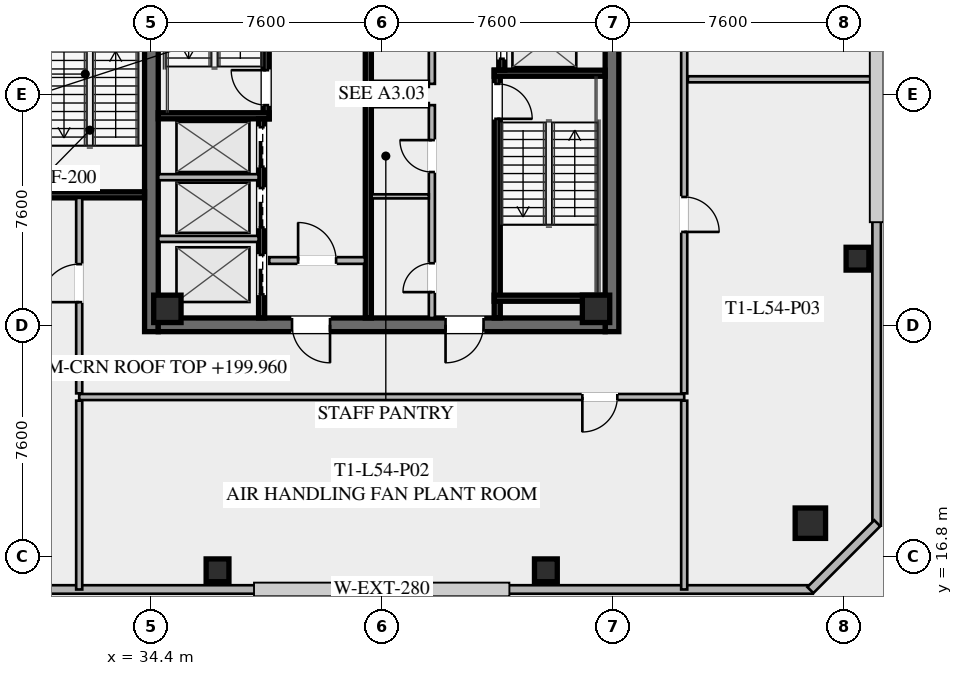
"""IFC4 building model, lengths in metres.
Left out: names, types, materials, properties, quantities, classifications, styles, units other than length and angle.
Written with IfcOpenShell. Run it as: python <this file> out.ifc"""

import sys

from ifc_helpers import new_model, si_unit, direction, frame, frame_2d, origin, origin_2d, place, context, subcontext, project, spatial, rectangle, hollow_rectangle, extrude, element, fill, save


model = new_model("IFC4")
c1 = context("Model", 3, precision=1e-05, world=origin(), true_north=direction((0.0, 1.0)))
c2 = subcontext(c1, "Body", "Model", "MODEL_VIEW")
j1 = project(units=[si_unit("LENGTHUNIT", "METRE"), si_unit("PLANEANGLEUNIT", "RADIAN")], contexts=[c1])
p1 = place(None, origin())
s1 = spatial("IfcSite", under=j1, at=p1, CompositionType="ELEMENT")
p2 = place(p1, origin())
s2 = spatial("IfcBuilding", under=s1, at=p2, CompositionType="ELEMENT")
p3 = place(p2, frame((0.0, 0.0, 199.6)))
s3 = spatial("IfcBuildingStorey", under=s2, at=p3, CompositionType="ELEMENT", Elevation=199.6)
for number, where, z_axis, x_axis in (
    (1, (34.425, 24.2, 0.0), (0.0, 0.0, 1.0), (0.0, 1.0, 0.0)),
    (2, (49.575, 39.8, 0.0), (0.0, 0.0, 1.0), (0.0, -1.0, 0.0)),
):
    element("IfcWall", number, at=place(p3, frame(where, z_axis=z_axis, x_axis=x_axis)), inside=s3, PredefinedType="SHEAR", context=c2, shape_type="SweptSolid", body=[
        extrude(rectangle(XDim=15.6, YDim=0.45, at=frame_2d((7.8, 0.0))), origin(), (0.0, 0.0, 1.0), 4.6),
    ])
p4 = place(p3, frame((49.35, 24.425, 0.0), z_axis=(0.0, 0.0, 1.0), x_axis=(-1.0, 0.0, 0.0)))
e3 = element("IfcWall", 3, at=p4, inside=s3, PredefinedType="SHEAR", context=c2, shape_type="SweptSolid", body=[
    extrude(rectangle(XDim=14.7, YDim=0.45, at=frame_2d((7.35, 0.0))), origin(), (0.0, 0.0, 1.0), 4.6),
])
p5 = place(p4, frame((9.05, 0.0, 0.0)))
e4 = element("IfcOpeningElement", 4, at=p5, cuts=e3, PredefinedType="OPENING", context=c2, shape_type="SweptSolid", body=[
    extrude(rectangle(XDim=1.25, YDim=2.25, at=frame_2d((0.625, 1.125))), frame((0.0, 0.235, 0.0), z_axis=(0.0, -1.0, 0.0), x_axis=(1.0, 0.0, 0.0)), (0.0, 0.0, 1.0), 0.47),
])
p6 = place(p4, frame((4.0, 0.0, 0.0)))
e5 = element("IfcOpeningElement", 5, at=p6, cuts=e3, PredefinedType="OPENING", context=c2, shape_type="SweptSolid", body=[
    extrude(rectangle(XDim=1.25, YDim=2.25, at=frame_2d((0.625, 1.125))), frame((0.0, 0.235, 0.0), z_axis=(0.0, -1.0, 0.0), x_axis=(1.0, 0.0, 0.0)), (0.0, 0.0, 1.0), 0.47),
])
for number, where, z_axis, x_axis in (
    (6, (34.95, 24.95, 0.0), (0.0, 0.0, 1.0), (1.0, 0.0, 0.0)),
    (7, (49.05, 24.95, 0.0), (0.0, 0.0, 1.0), (1.0, 0.0, 0.0)),
):
    element("IfcColumn", number, at=place(p3, frame(where, z_axis=z_axis, x_axis=x_axis)), inside=s3, PredefinedType="COLUMN", context=c2, shape_type="SweptSolid", body=[
        extrude(hollow_rectangle(XDim=0.9, YDim=0.9, WallThickness=0.04, at=origin_2d()), origin(), (0.0, 0.0, 1.0), 4.42),
    ])
p7 = place(p3, frame((56.1, 17.9, -0.295), z_axis=(0.0, 0.0, 1.0), x_axis=(1.0, 0.0, 0.0)))
e8 = element("IfcColumn", 8, at=p7, inside=s3, PredefinedType="COLUMN", context=c2, shape_type="SweptSolid", body=[
    extrude(hollow_rectangle(XDim=1.0, YDim=1.0, WallThickness=0.04, at=origin_2d()), origin(), (0.0, 0.0, 1.0), 4.715),
])
for number, where, z_axis, x_axis in (
    (9, (36.6, 16.35, -0.295), (0.0, 0.0, 1.0), (1.0, 0.0, 0.0)),
    (10, (47.4, 16.35, -0.295), (0.0, 0.0, 1.0), (1.0, 0.0, 0.0)),
    (11, (57.65, 26.6, -0.295), (0.0, 0.0, 1.0), (1.0, 0.0, 0.0)),
):
    element("IfcColumn", number, at=place(p3, frame(where, z_axis=z_axis, x_axis=x_axis)), inside=s3, PredefinedType="COLUMN", context=c2, shape_type="SweptSolid", body=[
        extrude(hollow_rectangle(XDim=0.75, YDim=0.75, WallThickness=0.032, at=origin_2d()), origin(), (0.0, 0.0, 1.0), 4.715),
    ])
for number, where, z_axis, x_axis in (
    (12, (56.18, 15.72, 0.0), (0.0, 0.0, 1.0), (-1.0, 0.0, 0.0)),
    (13, (58.28, 46.18, 0.0), (0.0, 0.0, 1.0), (0.0, -1.0, 0.0)),
):
    element("IfcWall", number, at=place(p3, frame(where, z_axis=z_axis, x_axis=x_axis)), inside=s3, PredefinedType="SOLIDWALL", context=c2, shape_type="SweptSolid", body=[
        extrude(rectangle(XDim=28.36, YDim=0.28, at=frame_2d((14.18, 0.0))), origin(), (0.0, 0.0, 1.0), 4.42),
    ])
p8 = place(p3, frame((58.3, 17.9, 0.0), z_axis=(0.0, 0.0, 1.0), x_axis=(-0.707106781187, -0.707106781187, 0.0)))
e14 = element("IfcWall", 14, at=p8, inside=s3, PredefinedType="SOLIDWALL", context=c2, shape_type="SweptSolid", body=[
    extrude(rectangle(XDim=3.111, YDim=0.28, at=frame_2d((1.556, 0.0))), origin(), (0.0, 0.0, 1.0), 4.42),
])
p9 = place(p3, frame((38.2, 31.2, 0.0), z_axis=(0.0, 0.0, 1.0), x_axis=(0.0, 1.0, 0.0)))
e15 = element("IfcWall", 15, at=p9, inside=s3, PredefinedType="SHEAR", context=c2, shape_type="SweptSolid", body=[
    extrude(rectangle(XDim=8.15, YDim=0.2, at=frame_2d((4.075, 0.0))), origin(), (0.0, 0.0, 1.0), 4.42),
])
p10 = place(p9, frame((0.45, 0.0, 0.0)))
e16 = element("IfcOpeningElement", 16, at=p10, cuts=e15, PredefinedType="OPENING", context=c2, shape_type="SweptSolid", body=[
    extrude(rectangle(XDim=1.15, YDim=2.2, at=frame_2d((0.575, 1.1))), frame((0.0, 0.11, 0.0), z_axis=(0.0, -1.0, 0.0), x_axis=(1.0, 0.0, 0.0)), (0.0, 0.0, 1.0), 0.22),
])
p11 = place(p3, frame((34.65, 31.3, 0.0), z_axis=(0.0, 0.0, 1.0), x_axis=(1.0, 0.0, 0.0)))
e17 = element("IfcWall", 17, at=p11, inside=s3, PredefinedType="SHEAR", context=c2, shape_type="SweptSolid", body=[
    extrude(rectangle(XDim=3.65, YDim=0.2, at=frame_2d((1.825, 0.0))), origin(), (0.0, 0.0, 1.0), 4.42),
])
p12 = place(p3, frame((45.8, 32.8, 0.0), z_axis=(0.0, 0.0, 1.0), x_axis=(0.0, -1.0, 0.0)))
e18 = element("IfcWall", 18, at=p12, inside=s3, PredefinedType="SHEAR", context=c2, shape_type="SweptSolid", body=[
    extrude(rectangle(XDim=8.15, YDim=0.2, at=frame_2d((4.075, 0.0))), origin(), (0.0, 0.0, 1.0), 4.42),
])
p13 = place(p12, frame((0.45, 0.0, 0.0)))
e19 = element("IfcOpeningElement", 19, at=p13, cuts=e18, PredefinedType="OPENING", context=c2, shape_type="SweptSolid", body=[
    extrude(rectangle(XDim=1.15, YDim=2.2, at=frame_2d((0.575, 1.1))), frame((0.0, 0.11, 0.0), z_axis=(0.0, -1.0, 0.0), x_axis=(1.0, 0.0, 0.0)), (0.0, 0.0, 1.0), 0.22),
])
for number, where, z_axis, x_axis in (
    (20, (45.7, 32.7, 0.0), (0.0, 0.0, 1.0), (1.0, 0.0, 0.0)),
    (21, (45.7, 25.3, 0.0), (0.0, 0.0, 1.0), (1.0, 0.0, 0.0)),
):
    element("IfcWall", number, at=place(p3, frame(where, z_axis=z_axis, x_axis=x_axis)), inside=s3, PredefinedType="SHEAR", context=c2, shape_type="SweptSolid", body=[
        extrude(rectangle(XDim=3.65, YDim=0.2, at=frame_2d((1.825, 0.0))), origin(), (0.0, 0.0, 1.0), 4.42),
    ])
p14 = place(p3, frame((41.56, 24.65, 0.0), z_axis=(0.0, 0.0, 1.0), x_axis=(0.0, 1.0, 0.0)))
e22 = element("IfcWall", 22, at=p14, inside=s3, PredefinedType="SHEAR", context=c2, shape_type="SweptSolid", body=[
    extrude(rectangle(XDim=14.7, YDim=0.2, at=frame_2d((7.35, 0.0))), origin(), (0.0, 0.0, 1.0), 4.42),
])
p15 = place(p3, frame((38.3, 26.54, 0.0), z_axis=(0.0, 0.0, 1.0), x_axis=(1.0, 0.0, 0.0)))
e23 = element("IfcWall", 23, at=p15, inside=s3, PredefinedType="SOLIDWALL", context=c2, shape_type="SweptSolid", body=[
    extrude(rectangle(XDim=3.15, YDim=0.22, at=frame_2d((1.575, 0.0))), origin(), (0.0, 0.0, 1.0), 3.531),
])
p16 = place(p15, frame((0.95, 0.0, 0.0)))
e24 = element("IfcOpeningElement", 24, at=p16, cuts=e23, PredefinedType="OPENING", context=c2, shape_type="SweptSolid", body=[
    extrude(rectangle(XDim=1.25, YDim=2.25, at=frame_2d((0.625, 1.125))), frame((0.0, 0.12, 0.0), z_axis=(0.0, -1.0, 0.0), x_axis=(1.0, 0.0, 0.0)), (0.0, 0.0, 1.0), 0.24),
])
p17 = place(p3, frame((38.05, 24.65, 0.0), z_axis=(0.0, 0.0, 1.0), x_axis=(0.0, 1.0, 0.0)))
e25 = element("IfcWall", 25, at=p17, inside=s3, PredefinedType="SHEAR", context=c2, shape_type="SweptSolid", body=[
    extrude(rectangle(XDim=6.55, YDim=0.2, at=frame_2d((3.275, 0.0))), origin(), (0.0, 0.0, 1.0), 4.42),
])
p18 = place(p17, frame((4.975, 0.0, 0.0)))
e26 = element("IfcOpeningElement", 26, at=p18, cuts=e25, PredefinedType="OPENING", context=c2, shape_type="SweptSolid", body=[
    extrude(rectangle(XDim=1.3, YDim=2.25, at=frame_2d((0.65, 1.125))), frame((0.0, 0.11, 0.0), z_axis=(0.0, -1.0, 0.0), x_axis=(1.0, 0.0, 0.0)), (0.0, 0.0, 1.0), 0.22),
])
p19 = place(p17, frame((2.975, 0.0, 0.0)))
e27 = element("IfcOpeningElement", 27, at=p19, cuts=e25, PredefinedType="OPENING", context=c2, shape_type="SweptSolid", body=[
    extrude(rectangle(XDim=1.3, YDim=2.25, at=frame_2d((0.65, 1.125))), frame((0.0, 0.11, 0.0), z_axis=(0.0, -1.0, 0.0), x_axis=(1.0, 0.0, 0.0)), (0.0, 0.0, 1.0), 0.22),
])
p20 = place(p17, frame((0.775, 0.0, 0.0)))
e28 = element("IfcOpeningElement", 28, at=p20, cuts=e25, PredefinedType="OPENING", context=c2, shape_type="SweptSolid", body=[
    extrude(rectangle(XDim=1.3, YDim=2.25, at=frame_2d((0.65, 1.125))), frame((0.0, 0.11, 0.0), z_axis=(0.0, -1.0, 0.0), x_axis=(1.0, 0.0, 0.0)), (0.0, 0.0, 1.0), 0.22),
])
for number, where, z_axis, x_axis in (
    (29, (34.65, 27.25, 0.0), (0.0, 0.0, 1.0), (1.0, 0.0, 0.0)),
    (30, (34.65, 29.28, 0.0), (0.0, 0.0, 1.0), (1.0, 0.0, 0.0)),
):
    element("IfcWall", number, at=place(p3, frame(where, z_axis=z_axis, x_axis=x_axis)), inside=s3, PredefinedType="SOLIDWALL", context=c2, shape_type="SweptSolid", body=[
        extrude(rectangle(XDim=3.3, YDim=0.2, at=frame_2d((1.65, 0.0))), origin(), (0.0, 0.0, 1.0), 4.42),
    ])
p21 = place(p3, frame((45.95, 39.35, 0.0), z_axis=(0.0, 0.0, 1.0), x_axis=(0.0, -1.0, 0.0)))
e31 = element("IfcWall", 31, at=p21, inside=s3, PredefinedType="SHEAR", context=c2, shape_type="SweptSolid", body=[
    extrude(rectangle(XDim=6.55, YDim=0.2, at=frame_2d((3.275, 0.0))), origin(), (0.0, 0.0, 1.0), 4.42),
])
p22 = place(p21, frame((5.075, 0.0, 0.0)))
e32 = element("IfcOpeningElement", 32, at=p22, cuts=e31, PredefinedType="OPENING", context=c2, shape_type="SweptSolid", body=[
    extrude(rectangle(XDim=1.1, YDim=2.2, at=frame_2d((0.55, 1.1))), frame((0.0, 0.11, 0.0), z_axis=(0.0, -1.0, 0.0), x_axis=(1.0, 0.0, 0.0)), (0.0, 0.0, 1.0), 0.22),
])
p23 = place(p21, frame((3.025, 0.0, 0.0)))
e33 = element("IfcOpeningElement", 33, at=p23, cuts=e31, PredefinedType="OPENING", context=c2, shape_type="SweptSolid", body=[
    extrude(rectangle(XDim=1.1, YDim=2.2, at=frame_2d((0.55, 1.1))), frame((0.0, 0.11, 0.0), z_axis=(0.0, -1.0, 0.0), x_axis=(1.0, 0.0, 0.0)), (0.0, 0.0, 1.0), 0.22),
])
p24 = place(p21, frame((1.025, 0.0, 0.0)))
e34 = element("IfcOpeningElement", 34, at=p24, cuts=e31, PredefinedType="OPENING", context=c2, shape_type="SweptSolid", body=[
    extrude(rectangle(XDim=1.1, YDim=2.2, at=frame_2d((0.55, 1.1))), frame((0.0, 0.11, 0.0), z_axis=(0.0, -1.0, 0.0), x_axis=(1.0, 0.0, 0.0)), (0.0, 0.0, 1.0), 0.22),
])
p25 = place(p3, frame((43.65, 24.65, 0.0), z_axis=(0.0, 0.0, 1.0), x_axis=(0.0, 1.0, 0.0)))
e35 = element("IfcWall", 35, at=p25, inside=s3, PredefinedType="SOLIDWALL", context=c2, shape_type="SweptSolid", body=[
    extrude(rectangle(XDim=7.0, YDim=0.2, at=frame_2d((3.5, 0.0))), origin(), (0.0, 0.0, 1.0), 3.531),
])
p26 = place(p25, frame((0.85, 0.0, 0.0)))
e36 = element("IfcOpeningElement", 36, at=p26, cuts=e35, PredefinedType="OPENING", context=c2, shape_type="SweptSolid", body=[
    extrude(rectangle(XDim=0.95, YDim=2.05, at=frame_2d((0.475, 1.025))), frame((0.0, 0.11, 0.0), z_axis=(0.0, -1.0, 0.0), x_axis=(1.0, 0.0, 0.0)), (0.0, 0.0, 1.0), 0.22),
])
p27 = place(p25, frame((4.8, 0.0, 0.0)))
e37 = element("IfcOpeningElement", 37, at=p27, cuts=e35, PredefinedType="OPENING", context=c2, shape_type="SweptSolid", body=[
    extrude(rectangle(XDim=1.05, YDim=2.2, at=frame_2d((0.525, 1.1))), frame((0.0, 0.11, 0.0), z_axis=(0.0, -1.0, 0.0), x_axis=(1.0, 0.0, 0.0)), (0.0, 0.0, 1.0), 0.22),
])
for number, where, z_axis, x_axis in (
    (38, (41.67, 31.65, 0.0), (0.0, 0.0, 1.0), (1.0, 0.0, 0.0)),
    (39, (41.67, 28.65, 0.0), (0.0, 0.0, 1.0), (1.0, 0.0, 0.0)),
):
    element("IfcWall", number, at=place(p3, frame(where, z_axis=z_axis, x_axis=x_axis)), inside=s3, PredefinedType="PARTITIONING", context=c2, shape_type="SweptSolid", body=[
        extrude(rectangle(XDim=1.88, YDim=0.135, at=frame_2d((0.94, 0.0))), origin(), (0.0, 0.0, 1.0), 3.531),
    ])
p28 = place(p3, frame((43.65, 32.35, 0.0), z_axis=(0.0, 0.0, 1.0), x_axis=(0.0, 1.0, 0.0)))
e40 = element("IfcWall", 40, at=p28, inside=s3, PredefinedType="SOLIDWALL", context=c2, shape_type="SweptSolid", body=[
    extrude(rectangle(XDim=7.0, YDim=0.2, at=frame_2d((3.5, 0.0))), origin(), (0.0, 0.0, 1.0), 4.42),
])
p29 = place(p3, frame((41.67, 32.35, 0.0), z_axis=(0.0, 0.0, 1.0), x_axis=(1.0, 0.0, 0.0)))
e41 = element("IfcWall", 41, at=p29, inside=s3, PredefinedType="SOLIDWALL", context=c2, shape_type="SweptSolid", body=[
    extrude(rectangle(XDim=1.88, YDim=0.2, at=frame_2d((0.94, 0.0))), origin(), (0.0, 0.0, 1.0), 4.42),
])
p30 = place(p3, frame((30.8, 28.7, 0.0), z_axis=(0.0, 0.0, 1.0), x_axis=(1.0, 0.0, 0.0)))
e42 = element("IfcWall", 42, at=p30, inside=s3, PredefinedType="SHEAR", context=c2, shape_type="SweptSolid", body=[
    extrude(rectangle(XDim=3.4, YDim=0.2, at=frame_2d((1.7, 0.0))), origin(), (0.0, 0.0, 1.0), 4.42),
])
p31 = place(p3, frame((51.95, 22.05, 0.0), z_axis=(0.0, 0.0, 1.0), x_axis=(-1.0, 0.0, 0.0)))
e43 = element("IfcWall", 43, at=p31, inside=s3, PredefinedType="SOLIDWALL", context=c2, shape_type="SweptSolid", body=[
    extrude(rectangle(XDim=19.9, YDim=0.2, at=frame_2d((9.95, 0.0))), origin(), (0.0, 0.0, 1.0), 3.531),
])
p32 = place(p31, frame((2.2, 0.0, 0.0)))
e44 = element("IfcOpeningElement", 44, at=p32, cuts=e43, PredefinedType="OPENING", context=c2, shape_type="SweptSolid", body=[
    extrude(rectangle(XDim=1.15, YDim=2.2, at=frame_2d((0.575, 1.1))), frame((0.0, 0.11, 0.0), z_axis=(0.0, -1.0, 0.0), x_axis=(1.0, 0.0, 0.0)), (0.0, 0.0, 1.0), 0.22),
])
p33 = place(p3, frame((51.95, 41.83, 0.0), z_axis=(0.0, 0.0, 1.0), x_axis=(0.0, -1.0, 0.0)))
e45 = element("IfcWall", 45, at=p33, inside=s3, PredefinedType="SOLIDWALL", context=c2, shape_type="SweptSolid", body=[
    extrude(rectangle(XDim=19.66, YDim=0.2, at=frame_2d((9.83, 0.0))), origin(), (0.0, 0.0, 1.0), 3.531),
])
p34 = place(p33, frame((3.0, 0.0, 0.0)))
e46 = element("IfcOpeningElement", 46, at=p34, cuts=e45, PredefinedType="OPENING", context=c2, shape_type="SweptSolid", body=[
    extrude(rectangle(XDim=1.25, YDim=2.25, at=frame_2d((0.625, 1.125))), frame((0.0, 0.11, 0.0), z_axis=(0.0, -1.0, 0.0), x_axis=(1.0, 0.0, 0.0)), (0.0, 0.0, 1.0), 0.22),
])
p35 = place(p33, frame((13.2, 0.0, 0.0)))
e47 = element("IfcOpeningElement", 47, at=p35, cuts=e45, PredefinedType="OPENING", context=c2, shape_type="SweptSolid", body=[
    extrude(rectangle(XDim=1.15, YDim=2.2, at=frame_2d((0.575, 1.1))), frame((0.0, 0.11, 0.0), z_axis=(0.0, -1.0, 0.0), x_axis=(1.0, 0.0, 0.0)), (0.0, 0.0, 1.0), 0.22),
])
p36 = place(p3, frame((32.05, 22.17, 0.0), z_axis=(0.0, 0.0, 1.0), x_axis=(0.0, 1.0, 0.0)))
e48 = element("IfcWall", 48, at=p36, inside=s3, PredefinedType="SOLIDWALL", context=c2, shape_type="SweptSolid", body=[
    extrude(rectangle(XDim=6.43, YDim=0.2, at=frame_2d((3.215, 0.0))), origin(), (0.0, 0.0, 1.0), 3.531),
])
p37 = place(p36, frame((3.0, 0.0, 0.0)))
e49 = element("IfcOpeningElement", 49, at=p37, cuts=e48, PredefinedType="OPENING", context=c2, shape_type="SweptSolid", body=[
    extrude(rectangle(XDim=1.25, YDim=2.25, at=frame_2d((0.625, 1.125))), frame((0.0, 0.11, 0.0), z_axis=(0.0, -1.0, 0.0), x_axis=(1.0, 0.0, 0.0)), (0.0, 0.0, 1.0), 0.22),
])
for number, where, z_axis, x_axis in (
    (50, (32.05, 21.93, 0.0), (0.0, 0.0, 1.0), (0.0, -1.0, 0.0)),
    (51, (51.95, 21.93, 0.0), (0.0, 0.0, 1.0), (0.0, -1.0, 0.0)),
    (52, (52.07, 32.5, 0.0), (0.0, 0.0, 1.0), (1.0, 0.0, 0.0)),
):
    element("IfcWall", number, at=place(p3, frame(where, z_axis=z_axis, x_axis=x_axis)), inside=s3, PredefinedType="SOLIDWALL", context=c2, shape_type="SweptSolid", body=[
        extrude(rectangle(XDim=6.21, YDim=0.2, at=frame_2d((3.105, 0.0))), origin(), (0.0, 0.0, 1.0), 3.531),
    ])
p38 = place(p5, origin())
e53 = element("IfcDoor", 53, at=p38, inside=s3, OperationType="SINGLE_SWING_LEFT", PredefinedType="DOOR", context=c2, shape_type="SweptSolid", body=[
    extrude(rectangle(XDim=1.25, YDim=2.25, at=frame_2d((0.625, 1.125))), frame((0.0, 0.025, 0.0), z_axis=(0.0, -1.0, 0.0), x_axis=(1.0, 0.0, 0.0)), (0.0, 0.0, 1.0), 0.05),
])
fill(e4, e53)
p39 = place(p6, origin())
e54 = element("IfcDoor", 54, at=p39, inside=s3, OperationType="SINGLE_SWING_RIGHT", PredefinedType="DOOR", context=c2, shape_type="SweptSolid", body=[
    extrude(rectangle(XDim=1.25, YDim=2.25, at=frame_2d((0.625, 1.125))), frame((0.0, 0.025, 0.0), z_axis=(0.0, -1.0, 0.0), x_axis=(1.0, 0.0, 0.0)), (0.0, 0.0, 1.0), 0.05),
])
fill(e5, e54)
p40 = place(p10, origin())
e55 = element("IfcDoor", 55, at=p40, inside=s3, OperationType="SINGLE_SWING_RIGHT", PredefinedType="DOOR", context=c2, shape_type="SweptSolid", body=[
    extrude(rectangle(XDim=1.15, YDim=2.2, at=frame_2d((0.575, 1.1))), frame((0.0, 0.025, 0.0), z_axis=(0.0, -1.0, 0.0), x_axis=(1.0, 0.0, 0.0)), (0.0, 0.0, 1.0), 0.05),
])
fill(e16, e55)
p41 = place(p13, origin())
e56 = element("IfcDoor", 56, at=p41, inside=s3, OperationType="SINGLE_SWING_RIGHT", PredefinedType="DOOR", context=c2, shape_type="SweptSolid", body=[
    extrude(rectangle(XDim=1.15, YDim=2.2, at=frame_2d((0.575, 1.1))), frame((0.0, 0.025, 0.0), z_axis=(0.0, -1.0, 0.0), x_axis=(1.0, 0.0, 0.0)), (0.0, 0.0, 1.0), 0.05),
])
fill(e19, e56)
p42 = place(p16, origin())
e57 = element("IfcDoor", 57, at=p42, inside=s3, OperationType="SINGLE_SWING_LEFT", PredefinedType="DOOR", context=c2, shape_type="SweptSolid", body=[
    extrude(rectangle(XDim=1.25, YDim=2.25, at=frame_2d((0.625, 1.125))), frame((0.0, 0.025, 0.0), z_axis=(0.0, -1.0, 0.0), x_axis=(1.0, 0.0, 0.0)), (0.0, 0.0, 1.0), 0.05),
])
fill(e24, e57)
p43 = place(p26, origin())
e58 = element("IfcDoor", 58, at=p43, inside=s3, OperationType="SINGLE_SWING_LEFT", PredefinedType="DOOR", context=c2, shape_type="SweptSolid", body=[
    extrude(rectangle(XDim=0.95, YDim=2.05, at=frame_2d((0.475, 1.025))), frame((0.0, 0.025, 0.0), z_axis=(0.0, -1.0, 0.0), x_axis=(1.0, 0.0, 0.0)), (0.0, 0.0, 1.0), 0.05),
])
fill(e36, e58)
p44 = place(p27, origin())
e59 = element("IfcDoor", 59, at=p44, inside=s3, OperationType="SINGLE_SWING_RIGHT", PredefinedType="DOOR", context=c2, shape_type="SweptSolid", body=[
    extrude(rectangle(XDim=1.05, YDim=2.2, at=frame_2d((0.525, 1.1))), frame((0.0, 0.025, 0.0), z_axis=(0.0, -1.0, 0.0), x_axis=(1.0, 0.0, 0.0)), (0.0, 0.0, 1.0), 0.05),
])
fill(e37, e59)
p45 = place(p32, origin())
e60 = element("IfcDoor", 60, at=p45, inside=s3, OperationType="SINGLE_SWING_RIGHT", PredefinedType="DOOR", context=c2, shape_type="SweptSolid", body=[
    extrude(rectangle(XDim=1.15, YDim=2.2, at=frame_2d((0.575, 1.1))), frame((0.0, 0.025, 0.0), z_axis=(0.0, -1.0, 0.0), x_axis=(1.0, 0.0, 0.0)), (0.0, 0.0, 1.0), 0.05),
])
fill(e44, e60)
p46 = place(p35, origin())
e61 = element("IfcDoor", 61, at=p46, inside=s3, OperationType="SINGLE_SWING_RIGHT", PredefinedType="DOOR", context=c2, shape_type="SweptSolid", body=[
    extrude(rectangle(XDim=1.15, YDim=2.2, at=frame_2d((0.575, 1.1))), frame((0.0, 0.025, 0.0), z_axis=(0.0, -1.0, 0.0), x_axis=(1.0, 0.0, 0.0)), (0.0, 0.0, 1.0), 0.05),
])
fill(e47, e61)
p47 = place(p37, origin())
e62 = element("IfcDoor", 62, at=p47, inside=s3, OperationType="SINGLE_SWING_LEFT", PredefinedType="DOOR", context=c2, shape_type="SweptSolid", body=[
    extrude(rectangle(XDim=1.25, YDim=2.25, at=frame_2d((0.625, 1.125))), frame((0.0, 0.025, 0.0), z_axis=(0.0, -1.0, 0.0), x_axis=(1.0, 0.0, 0.0)), (0.0, 0.0, 1.0), 0.05),
])
fill(e49, e62)
p48 = place(p18, origin())
e63 = element("IfcDoor", 63, at=p48, inside=s3, OperationType="SLIDING_TO_LEFT", PredefinedType="DOOR", context=c2, shape_type="SweptSolid", body=[
    extrude(rectangle(XDim=1.3, YDim=2.25, at=frame_2d((0.65, 1.125))), frame((0.0, 0.025, 0.0), z_axis=(0.0, -1.0, 0.0), x_axis=(1.0, 0.0, 0.0)), (0.0, 0.0, 1.0), 0.05),
])
fill(e26, e63)
p49 = place(p19, origin())
e64 = element("IfcDoor", 64, at=p49, inside=s3, OperationType="SLIDING_TO_LEFT", PredefinedType="DOOR", context=c2, shape_type="SweptSolid", body=[
    extrude(rectangle(XDim=1.3, YDim=2.25, at=frame_2d((0.65, 1.125))), frame((0.0, 0.025, 0.0), z_axis=(0.0, -1.0, 0.0), x_axis=(1.0, 0.0, 0.0)), (0.0, 0.0, 1.0), 0.05),
])
fill(e27, e64)
p50 = place(p20, origin())
e65 = element("IfcDoor", 65, at=p50, inside=s3, OperationType="SLIDING_TO_LEFT", PredefinedType="DOOR", context=c2, shape_type="SweptSolid", body=[
    extrude(rectangle(XDim=1.3, YDim=2.25, at=frame_2d((0.65, 1.125))), frame((0.0, 0.025, 0.0), z_axis=(0.0, -1.0, 0.0), x_axis=(1.0, 0.0, 0.0)), (0.0, 0.0, 1.0), 0.05),
])
fill(e28, e65)
p51 = place(p22, origin())
e66 = element("IfcDoor", 66, at=p51, inside=s3, OperationType="SLIDING_TO_LEFT", PredefinedType="DOOR", context=c2, shape_type="SweptSolid", body=[
    extrude(rectangle(XDim=1.1, YDim=2.2, at=frame_2d((0.55, 1.1))), frame((0.0, 0.025, 0.0), z_axis=(0.0, -1.0, 0.0), x_axis=(1.0, 0.0, 0.0)), (0.0, 0.0, 1.0), 0.05),
])
fill(e32, e66)
save(model, sys.argv[1])
